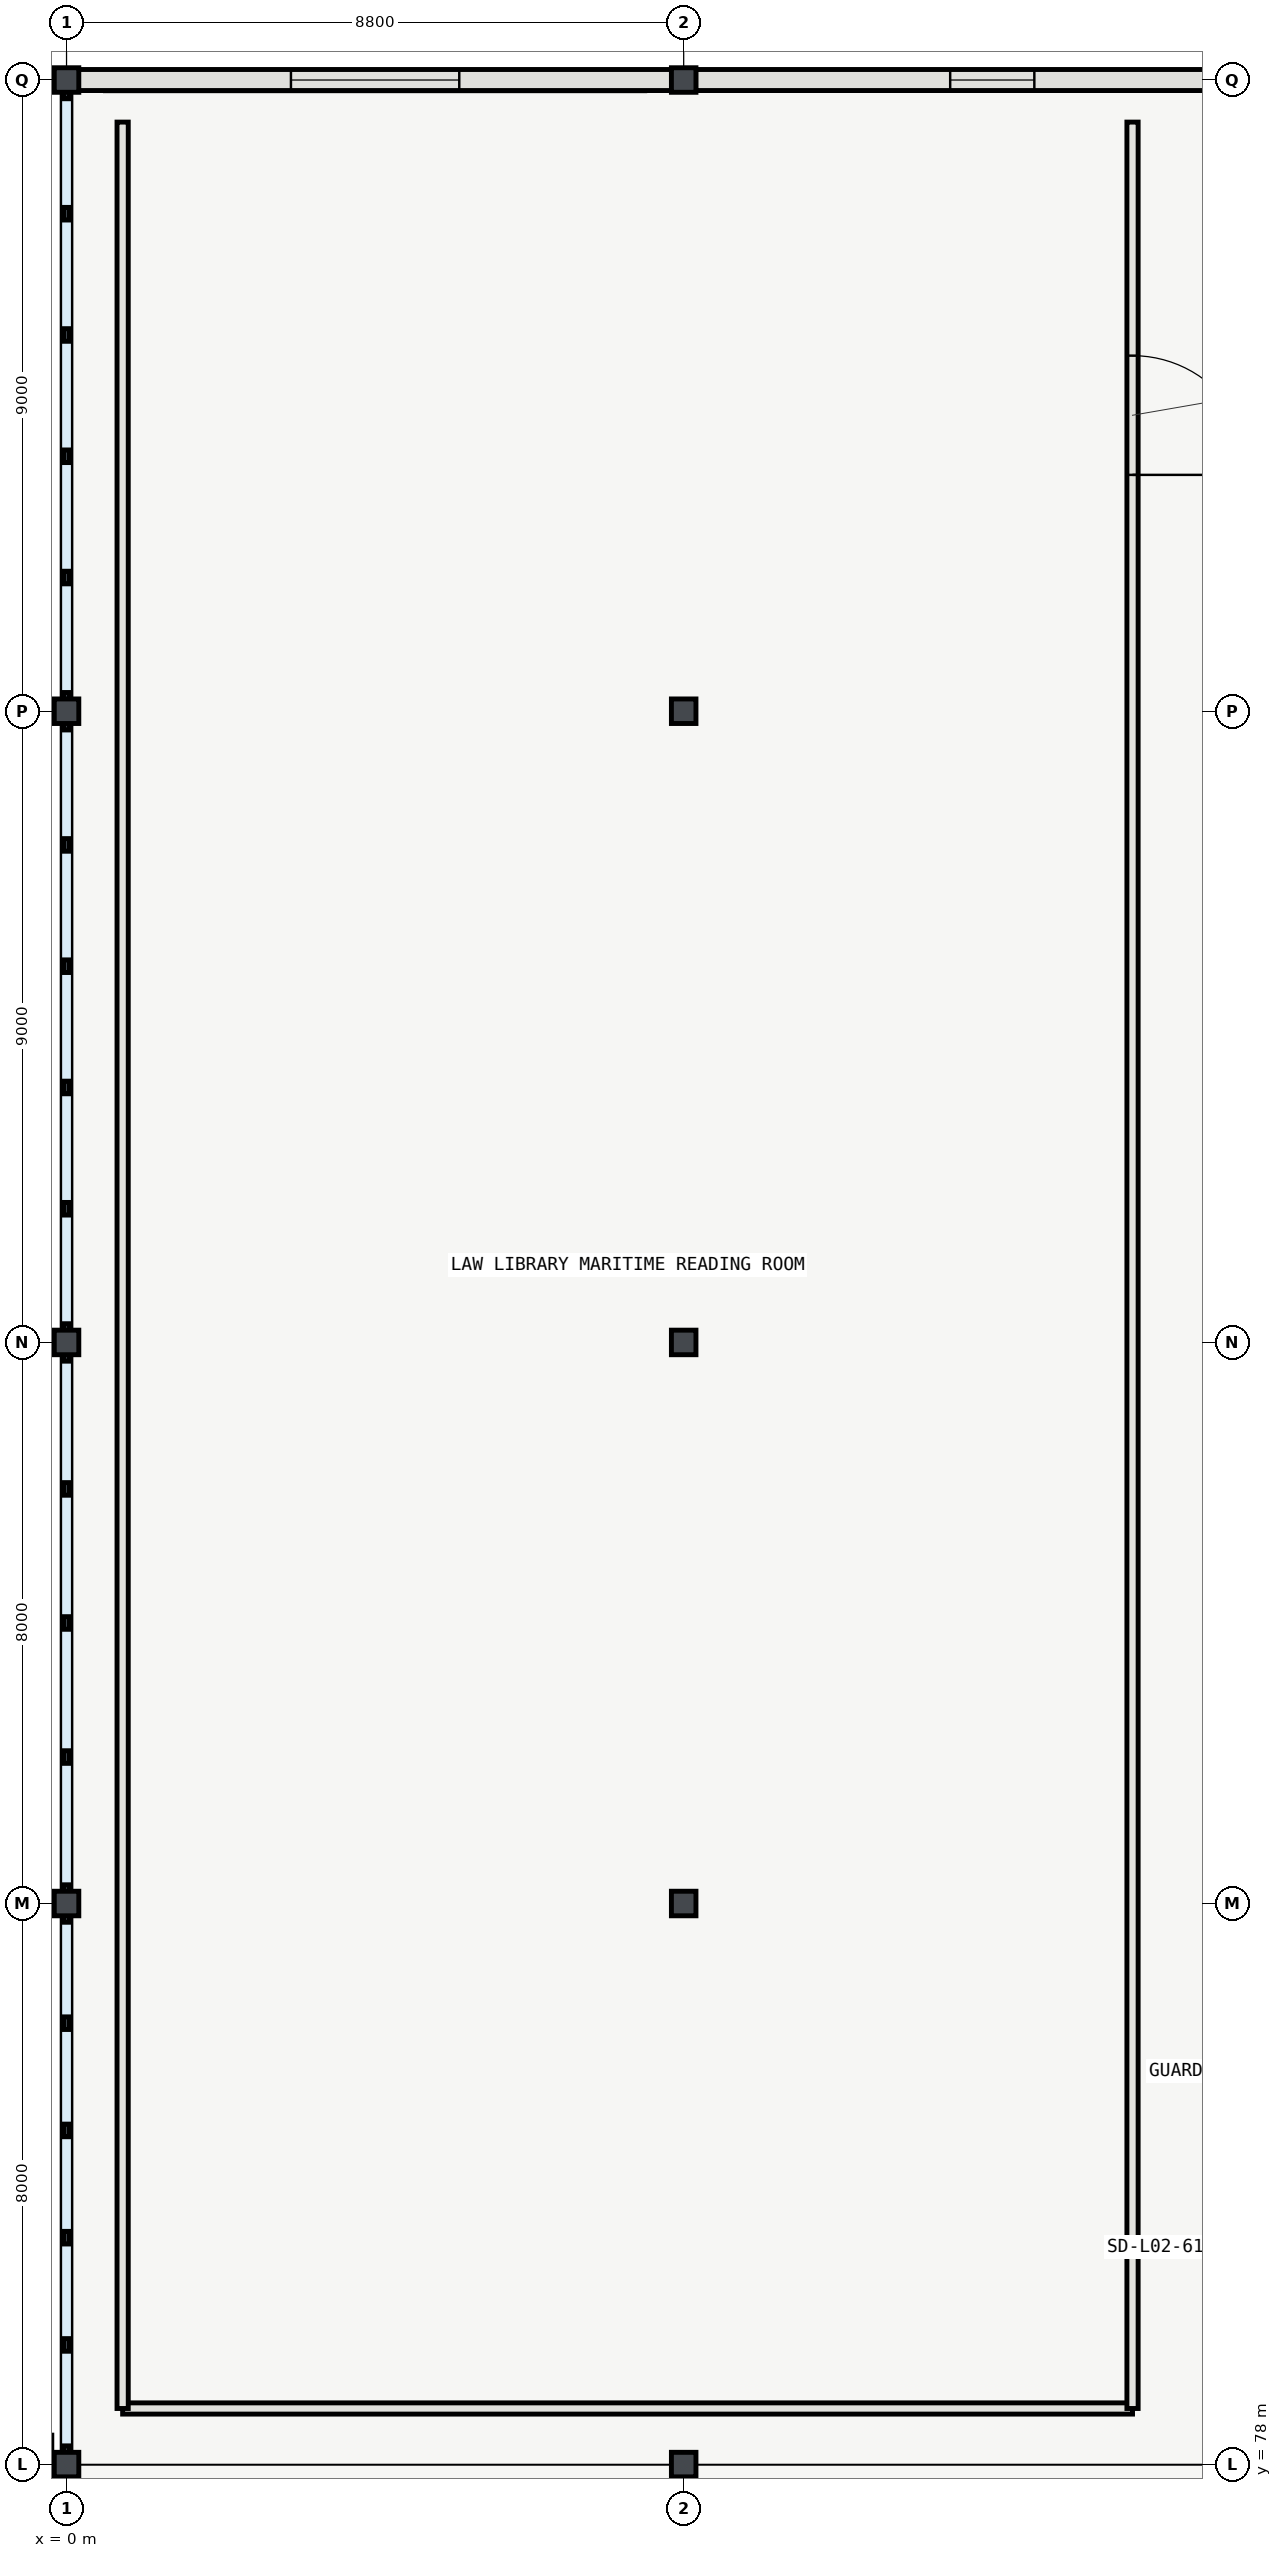
"""IFC4 building model, lengths in metres.
Left out: names, types, materials, properties, quantities, classifications, styles, units other than length and angle.
Written with IfcOpenShell. Run it as: python <this file> out.ifc"""

import sys

from ifc_helpers import new_model, si_unit, direction, frame, frame_2d, origin, origin_2d, place, context, subcontext, project, spatial, rectangle, i_section, extrude, element, fill, save


model = new_model("IFC4")
c1 = context("Model", 3, precision=1e-05, world=origin(), true_north=direction((0.0, 1.0)))
c2 = subcontext(c1, "Body", "Model", "MODEL_VIEW")
j1 = project(units=[si_unit("LENGTHUNIT", "METRE"), si_unit("PLANEANGLEUNIT", "RADIAN")], contexts=[c1])
p1 = place(None, origin())
s1 = spatial("IfcSite", under=j1, at=p1, CompositionType="ELEMENT")
p2 = place(p1, origin())
s2 = spatial("IfcBuilding", under=s1, at=p2, CompositionType="ELEMENT")
p3 = place(p2, frame((0.0, 0.0, 10.8)))
s3 = spatial("IfcBuildingStorey", under=s2, at=p3, CompositionType="ELEMENT", Elevation=10.8)
for number, where, z_axis, x_axis in (
    (1, (0.0, 78.0, 0.0), (0.0, 0.0, 1.0), (1.0, 0.0, 0.0)),
    (2, (0.0, 86.0, 0.0), (0.0, 0.0, 1.0), (1.0, 0.0, 0.0)),
    (3, (0.0, 94.0, 0.0), (0.0, 0.0, 1.0), (1.0, 0.0, 0.0)),
    (4, (0.0, 103.0, 0.0), (0.0, 0.0, 1.0), (1.0, 0.0, 0.0)),
    (5, (0.0, 112.0, 0.0), (0.0, 0.0, 1.0), (1.0, 0.0, 0.0)),
    (6, (8.8, 78.0, 0.0), (0.0, 0.0, 1.0), (1.0, 0.0, 0.0)),
    (7, (8.8, 86.0, 0.0), (0.0, 0.0, 1.0), (1.0, 0.0, 0.0)),
    (8, (8.8, 94.0, 0.0), (0.0, 0.0, 1.0), (1.0, 0.0, 0.0)),
    (9, (8.8, 103.0, 0.0), (0.0, 0.0, 1.0), (1.0, 0.0, 0.0)),
    (10, (8.8, 112.0, 0.0), (0.0, 0.0, 1.0), (1.0, 0.0, 0.0)),
):
    element("IfcColumn", number, at=place(p3, frame(where, z_axis=z_axis, x_axis=x_axis)), inside=s3, PredefinedType="COLUMN", context=c2, shape_type="SweptSolid", body=[
        extrude(i_section(OverallWidth=0.35, OverallDepth=0.35, WebThickness=0.012, FlangeThickness=0.019, FilletRadius=0.02, at=origin_2d()), origin(), (0.0, 0.0, 1.0), 5.4),
    ])
p4 = place(p3, frame((8.629, 112.0, 0.0), z_axis=(0.0, 0.0, 1.0), x_axis=(-1.0, 0.0, 0.0)))
e11 = element("IfcWall", 11, at=p4, inside=s3, PredefinedType="SOLIDWALL", context=c2, shape_type="SweptSolid", body=[
    extrude(rectangle(XDim=8.458, YDim=0.3, at=frame_2d((4.229, 0.0))), origin(), (0.0, 0.0, 1.0), 4.763),
])
p5 = place(p4, frame((3.029, 0.0, 0.95)))
e12 = element("IfcOpeningElement", 12, at=p5, cuts=e11, PredefinedType="OPENING", context=c2, shape_type="SweptSolid", body=[
    extrude(rectangle(XDim=2.4, YDim=1.8, at=frame_2d((1.2, 0.9))), frame((0.0, 0.16, 0.0), z_axis=(0.0, -1.0, 0.0), x_axis=(1.0, 0.0, 0.0)), (0.0, 0.0, 1.0), 0.32),
])
p6 = place(p3, frame((17.429, 112.0, 0.0), z_axis=(0.0, 0.0, 1.0), x_axis=(-1.0, 0.0, 0.0)))
e13 = element("IfcWall", 13, at=p6, inside=s3, PredefinedType="SOLIDWALL", context=c2, shape_type="SweptSolid", body=[
    extrude(rectangle(XDim=8.458, YDim=0.3, at=frame_2d((4.229, 0.0))), origin(), (0.0, 0.0, 1.0), 4.763),
])
p7 = place(p6, frame((3.629, 0.0, 0.95)))
e14 = element("IfcOpeningElement", 14, at=p7, cuts=e13, PredefinedType="OPENING", context=c2, shape_type="SweptSolid", body=[
    extrude(rectangle(XDim=1.2, YDim=2.1, at=frame_2d((0.6, 1.05))), frame((0.0, 0.16, 0.0), z_axis=(0.0, -1.0, 0.0), x_axis=(1.0, 0.0, 0.0)), (0.0, 0.0, 1.0), 0.32),
])
p8 = place(p3, frame((0.8, 78.8, 0.0), z_axis=(0.0, 0.0, 1.0), x_axis=(1.0, 0.0, 0.0)))
e15 = element("IfcWall", 15, at=p8, inside=s3, PredefinedType="PARTITIONING", context=c2, shape_type="SweptSolid", body=[
    extrude(rectangle(XDim=14.4, YDim=0.16, at=frame_2d((7.2, 0.0))), origin(), (0.0, 0.0, 1.0), 5.12),
])
p9 = place(p3, frame((0.8, 111.4, 0.0), z_axis=(0.0, 0.0, 1.0), x_axis=(0.0, -1.0, 0.0)))
e16 = element("IfcWall", 16, at=p9, inside=s3, PredefinedType="PARTITIONING", context=c2, shape_type="SweptSolid", body=[
    extrude(rectangle(XDim=32.6, YDim=0.16, at=frame_2d((16.3, 0.0))), origin(), (0.0, 0.0, 1.0), 5.12),
])
p10 = place(p3, frame((15.2, 78.8, 0.0), z_axis=(0.0, 0.0, 1.0), x_axis=(0.0, 1.0, 0.0)))
e17 = element("IfcWall", 17, at=p10, inside=s3, PredefinedType="PARTITIONING", context=c2, shape_type="SweptSolid", body=[
    extrude(rectangle(XDim=32.6, YDim=0.16, at=frame_2d((16.3, 0.0))), origin(), (0.0, 0.0, 1.0), 5.12),
])
p11 = place(p10, frame((27.57, 0.0, 0.0)))
e18 = element("IfcOpeningElement", 18, at=p11, cuts=e17, PredefinedType="OPENING", context=c2, shape_type="SweptSolid", body=[
    extrude(rectangle(XDim=1.7, YDim=2.3, at=frame_2d((0.85, 1.15))), frame((0.0, 0.09, 0.0), z_axis=(0.0, -1.0, 0.0), x_axis=(1.0, 0.0, 0.0)), (0.0, 0.0, 1.0), 0.18),
])
p12 = place(p5, origin())
e19 = element("IfcWindow", 19, at=p12, inside=s3, PartitioningType="SINGLE_PANEL", PredefinedType="WINDOW", context=c2, shape_type="SweptSolid", body=[
    extrude(rectangle(XDim=2.4, YDim=1.8, at=frame_2d((1.2, 0.9))), frame((0.0, 0.03, 0.0), z_axis=(0.0, -1.0, 0.0), x_axis=(1.0, 0.0, 0.0)), (0.0, 0.0, 1.0), 0.06),
])
fill(e12, e19)
p13 = place(p7, origin())
e20 = element("IfcWindow", 20, at=p13, inside=s3, PartitioningType="SINGLE_PANEL", PredefinedType="WINDOW", context=c2, shape_type="SweptSolid", body=[
    extrude(rectangle(XDim=1.2, YDim=2.1, at=frame_2d((0.6, 1.05))), frame((0.0, 0.03, 0.0), z_axis=(0.0, -1.0, 0.0), x_axis=(1.0, 0.0, 0.0)), (0.0, 0.0, 1.0), 0.06),
])
fill(e14, e20)
p14 = place(p11, origin())
e21 = element("IfcDoor", 21, at=p14, inside=s3, OperationType="DOUBLE_DOOR_SINGLE_SWING", PredefinedType="DOOR", context=c2, shape_type="SweptSolid", body=[
    extrude(rectangle(XDim=1.7, YDim=2.3, at=frame_2d((0.85, 1.15))), frame((0.0, 0.025, 0.0), z_axis=(0.0, -1.0, 0.0), x_axis=(1.0, 0.0, 0.0)), (0.0, 0.0, 1.0), 0.05),
])
fill(e18, e21)
save(model, sys.argv[1])
